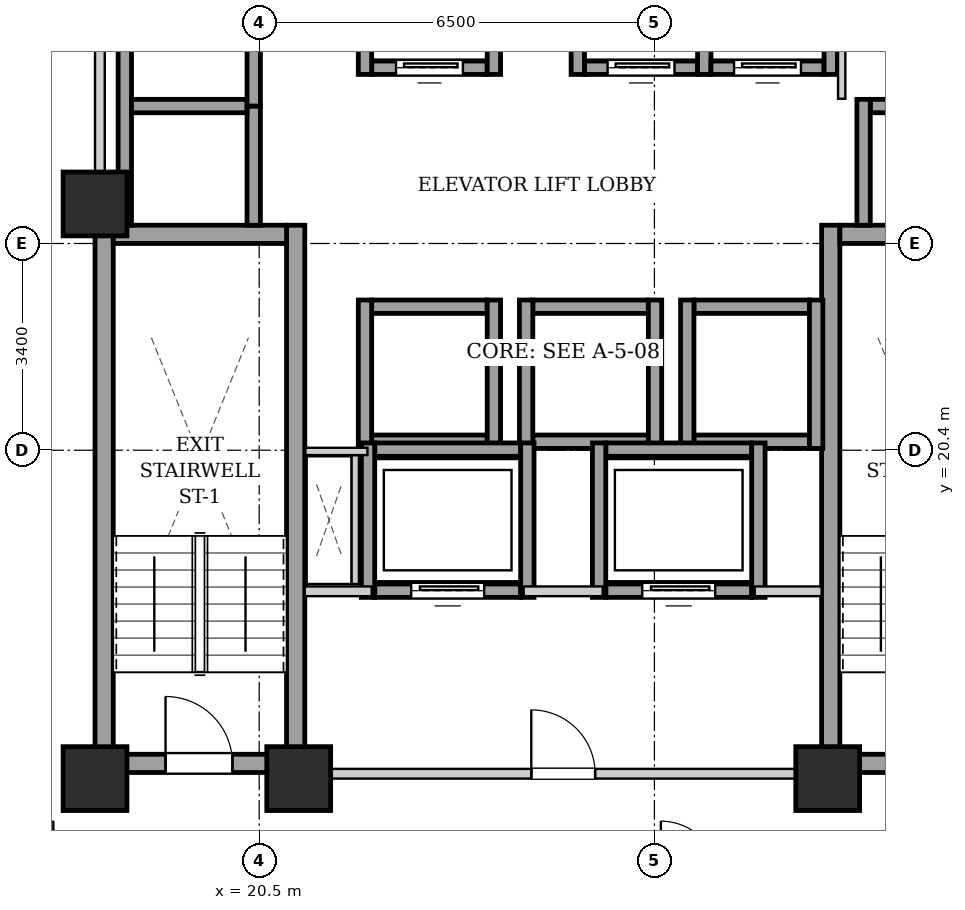
"""IFC4 building model, lengths in metres.
Left out: names, types, materials, properties, quantities, classifications, styles, units other than length and angle.
Written with IfcOpenShell. Run it as: python <this file> out.ifc"""

import sys

from ifc_helpers import new_model, si_unit, direction, frame, frame_2d, origin, origin_2d, place, context, subcontext, project, spatial, rectangle, extrude, element, fill, save


model = new_model("IFC4")
c1 = context("Model", 3, precision=1e-05, world=origin(), true_north=direction((0.0, 1.0)))
c2 = subcontext(c1, "Body", "Model", "MODEL_VIEW")
j1 = project(units=[si_unit("LENGTHUNIT", "METRE"), si_unit("PLANEANGLEUNIT", "RADIAN")], contexts=[c1])
p1 = place(None, origin())
s1 = spatial("IfcSite", under=j1, at=p1, CompositionType="ELEMENT")
p2 = place(p1, origin())
s2 = spatial("IfcBuilding", under=s1, at=p2, CompositionType="ELEMENT")
p3 = place(p2, frame((0.0, 0.0, 91.1)))
s3 = spatial("IfcBuildingStorey", under=s2, at=p3, CompositionType="ELEMENT", Elevation=91.1)
for number, where, z_axis, x_axis in (
    (1, (17.8, 15.0, 0.0), (0.0, 0.0, 1.0), (1.0, 0.0, 0.0)),
    (2, (21.15, 15.0, 0.0), (0.0, 0.0, 1.0), (1.0, 0.0, 0.0)),
    (3, (29.85, 15.0, 0.0), (0.0, 0.0, 1.0), (1.0, 0.0, 0.0)),
    (4, (17.8, 24.45, 0.0), (0.0, 0.0, 1.0), (1.0, 0.0, 0.0)),
):
    element("IfcColumn", number, at=place(p3, frame(where, z_axis=z_axis, x_axis=x_axis)), inside=s3, PredefinedType="COLUMN", context=c2, shape_type="SweptSolid", body=[
        extrude(rectangle(XDim=1.05, YDim=1.05, at=origin_2d()), origin(), (0.0, 0.0, 1.0), 3.2),
    ])
for number, where, z_axis, x_axis in (
    (5, (17.95, 15.1, 0.0), (0.0, 0.0, 1.0), (0.0, 1.0, 0.0)),
    (6, (21.1, 15.1, 0.0), (0.0, 0.0, 1.0), (0.0, 1.0, 0.0)),
):
    element("IfcWall", number, at=place(p3, frame(where, z_axis=z_axis, x_axis=x_axis)), inside=s3, PredefinedType="SHEAR", context=c2, shape_type="SweptSolid", body=[
        extrude(rectangle(XDim=9.0, YDim=0.3, at=frame_2d((4.5, 0.0))), origin(), (0.0, 0.0, 1.0), 2.94),
    ])
p4 = place(p3, frame((18.1, 23.95, 0.0), z_axis=(0.0, 0.0, 1.0), x_axis=(1.0, 0.0, 0.0)))
e7 = element("IfcWall", 7, at=p4, inside=s3, PredefinedType="SHEAR", context=c2, shape_type="SweptSolid", body=[
    extrude(rectangle(XDim=2.85, YDim=0.3, at=frame_2d((1.425, 0.0))), origin(), (0.0, 0.0, 1.0), 2.94),
])
p5 = place(p3, frame((18.1, 15.25, 0.0), z_axis=(0.0, 0.0, 1.0), x_axis=(1.0, 0.0, 0.0)))
e8 = element("IfcWall", 8, at=p5, inside=s3, PredefinedType="SHEAR", context=c2, shape_type="SweptSolid", body=[
    extrude(rectangle(XDim=2.85, YDim=0.3, at=frame_2d((1.425, 0.0))), origin(), (0.0, 0.0, 1.0), 2.94),
])
p6 = place(p5, frame((0.86, 0.0, 0.0)))
e9 = element("IfcOpeningElement", 9, at=p6, cuts=e8, PredefinedType="OPENING", context=c2, shape_type="SweptSolid", body=[
    extrude(rectangle(XDim=1.1, YDim=2.05, at=frame_2d((0.55, 1.025))), frame((0.0, 0.16, 0.0), z_axis=(0.0, -1.0, 0.0), x_axis=(1.0, 0.0, 0.0)), (0.0, 0.0, 1.0), 0.32),
])
p7 = place(p3, frame((29.9, 15.1, 0.0), z_axis=(0.0, 0.0, 1.0), x_axis=(0.0, 1.0, 0.0)))
e10 = element("IfcWall", 10, at=p7, inside=s3, PredefinedType="SHEAR", context=c2, shape_type="SweptSolid", body=[
    extrude(rectangle(XDim=9.0, YDim=0.3, at=frame_2d((4.5, 0.0))), origin(), (0.0, 0.0, 1.0), 2.94),
])
p8 = place(p3, frame((30.05, 23.95, 0.0), z_axis=(0.0, 0.0, 1.0), x_axis=(1.0, 0.0, 0.0)))
e11 = element("IfcWall", 11, at=p8, inside=s3, PredefinedType="SHEAR", context=c2, shape_type="SweptSolid", body=[
    extrude(rectangle(XDim=2.85, YDim=0.3, at=frame_2d((1.425, 0.0))), origin(), (0.0, 0.0, 1.0), 2.94),
])
p9 = place(p3, frame((30.05, 15.25, 0.0), z_axis=(0.0, 0.0, 1.0), x_axis=(1.0, 0.0, 0.0)))
e12 = element("IfcWall", 12, at=p9, inside=s3, PredefinedType="SHEAR", context=c2, shape_type="SweptSolid", body=[
    extrude(rectangle(XDim=2.85, YDim=0.3, at=frame_2d((1.425, 0.0))), origin(), (0.0, 0.0, 1.0), 2.94),
])
p10 = place(p9, frame((0.86, 0.0, 0.0)))
e13 = element("IfcOpeningElement", 13, at=p10, cuts=e12, PredefinedType="OPENING", context=c2, shape_type="SweptSolid", body=[
    extrude(rectangle(XDim=1.1, YDim=2.05, at=frame_2d((0.55, 1.025))), frame((0.0, 0.16, 0.0), z_axis=(0.0, -1.0, 0.0), x_axis=(1.0, 0.0, 0.0)), (0.0, 0.0, 1.0), 0.32),
])
p11 = place(p3, frame((22.35, 26.69, 0.0), z_axis=(0.0, 0.0, 1.0), x_axis=(1.0, 0.0, 0.0)))
e14 = element("IfcWall", 14, at=p11, inside=s3, PredefinedType="SHEAR", context=c2, shape_type="SweptSolid", body=[
    extrude(rectangle(XDim=1.9, YDim=0.22, at=frame_2d((0.95, 0.0))), origin(), (0.0, 0.0, 1.0), 2.94),
])
p12 = place(p11, frame((0.4, 0.0, 0.0)))
e15 = element("IfcOpeningElement", 15, at=p12, cuts=e14, PredefinedType="OPENING", context=c2, shape_type="SweptSolid", body=[
    extrude(rectangle(XDim=1.1, YDim=2.15, at=frame_2d((0.55, 1.075))), frame((0.0, 0.12, 0.0), z_axis=(0.0, -1.0, 0.0), x_axis=(1.0, 0.0, 0.0)), (0.0, 0.0, 1.0), 0.24),
])
for number, where, z_axis, x_axis in (
    (16, (22.24, 26.58, 0.0), (0.0, 0.0, 1.0), (0.0, 1.0, 0.0)),
    (17, (24.36, 26.58, 0.0), (0.0, 0.0, 1.0), (0.0, 1.0, 0.0)),
):
    element("IfcWall", number, at=place(p3, frame(where, z_axis=z_axis, x_axis=x_axis)), inside=s3, PredefinedType="SHEAR", context=c2, shape_type="SweptSolid", body=[
        extrude(rectangle(XDim=2.44, YDim=0.22, at=frame_2d((1.22, 0.0))), origin(), (0.0, 0.0, 1.0), 2.94),
    ])
p13 = place(p3, frame((25.85, 26.69, 0.0), z_axis=(0.0, 0.0, 1.0), x_axis=(1.0, 0.0, 0.0)))
e18 = element("IfcWall", 18, at=p13, inside=s3, PredefinedType="SHEAR", context=c2, shape_type="SweptSolid", body=[
    extrude(rectangle(XDim=1.86, YDim=0.22, at=frame_2d((0.93, 0.0))), origin(), (0.0, 0.0, 1.0), 2.94),
])
p14 = place(p13, frame((0.38, 0.0, 0.0)))
e19 = element("IfcOpeningElement", 19, at=p14, cuts=e18, PredefinedType="OPENING", context=c2, shape_type="SweptSolid", body=[
    extrude(rectangle(XDim=1.1, YDim=2.15, at=frame_2d((0.55, 1.075))), frame((0.0, 0.12, 0.0), z_axis=(0.0, -1.0, 0.0), x_axis=(1.0, 0.0, 0.0)), (0.0, 0.0, 1.0), 0.24),
])
for number, where, z_axis, x_axis in (
    (20, (25.74, 26.58, 0.0), (0.0, 0.0, 1.0), (0.0, 1.0, 0.0)),
    (21, (27.82, 26.58, 0.0), (0.0, 0.0, 1.0), (0.0, 1.0, 0.0)),
):
    element("IfcWall", number, at=place(p3, frame(where, z_axis=z_axis, x_axis=x_axis)), inside=s3, PredefinedType="SHEAR", context=c2, shape_type="SweptSolid", body=[
        extrude(rectangle(XDim=2.44, YDim=0.22, at=frame_2d((1.22, 0.0))), origin(), (0.0, 0.0, 1.0), 2.94),
    ])
p15 = place(p3, frame((27.93, 26.69, 0.0), z_axis=(0.0, 0.0, 1.0), x_axis=(1.0, 0.0, 0.0)))
e22 = element("IfcWall", 22, at=p15, inside=s3, PredefinedType="SHEAR", context=c2, shape_type="SweptSolid", body=[
    extrude(rectangle(XDim=1.86, YDim=0.22, at=frame_2d((0.93, 0.0))), origin(), (0.0, 0.0, 1.0), 2.94),
])
p16 = place(p15, frame((0.38, 0.0, 0.0)))
e23 = element("IfcOpeningElement", 23, at=p16, cuts=e22, PredefinedType="OPENING", context=c2, shape_type="SweptSolid", body=[
    extrude(rectangle(XDim=1.1, YDim=2.15, at=frame_2d((0.55, 1.075))), frame((0.0, 0.12, 0.0), z_axis=(0.0, -1.0, 0.0), x_axis=(1.0, 0.0, 0.0)), (0.0, 0.0, 1.0), 0.24),
])
p17 = place(p3, frame((29.9, 26.58, 0.0), z_axis=(0.0, 0.0, 1.0), x_axis=(0.0, 1.0, 0.0)))
e24 = element("IfcWall", 24, at=p17, inside=s3, PredefinedType="SHEAR", context=c2, shape_type="SweptSolid", body=[
    extrude(rectangle(XDim=2.44, YDim=0.22, at=frame_2d((1.22, 0.0))), origin(), (0.0, 0.0, 1.0), 2.94),
])
for number, where, z_axis, x_axis in (
    (25, (22.35, 20.54, 0.0), (0.0, 0.0, 1.0), (1.0, 0.0, 0.0)),
    (26, (22.35, 22.76, 0.0), (0.0, 0.0, 1.0), (1.0, 0.0, 0.0)),
):
    element("IfcWall", number, at=place(p3, frame(where, z_axis=z_axis, x_axis=x_axis)), inside=s3, PredefinedType="SHEAR", context=c2, shape_type="SweptSolid", body=[
        extrude(rectangle(XDim=1.9, YDim=0.22, at=frame_2d((0.95, 0.0))), origin(), (0.0, 0.0, 1.0), 2.94),
    ])
for number, where, z_axis, x_axis in (
    (27, (22.24, 20.43, 0.0), (0.0, 0.0, 1.0), (0.0, 1.0, 0.0)),
    (28, (24.36, 20.43, 0.0), (0.0, 0.0, 1.0), (0.0, 1.0, 0.0)),
):
    element("IfcWall", number, at=place(p3, frame(where, z_axis=z_axis, x_axis=x_axis)), inside=s3, PredefinedType="SHEAR", context=c2, shape_type="SweptSolid", body=[
        extrude(rectangle(XDim=2.44, YDim=0.22, at=frame_2d((1.22, 0.0))), origin(), (0.0, 0.0, 1.0), 2.94),
    ])
for number, where, z_axis, x_axis in (
    (29, (25.0, 20.54, 0.0), (0.0, 0.0, 1.0), (1.0, 0.0, 0.0)),
    (30, (25.0, 22.76, 0.0), (0.0, 0.0, 1.0), (1.0, 0.0, 0.0)),
):
    element("IfcWall", number, at=place(p3, frame(where, z_axis=z_axis, x_axis=x_axis)), inside=s3, PredefinedType="SHEAR", context=c2, shape_type="SweptSolid", body=[
        extrude(rectangle(XDim=1.9, YDim=0.22, at=frame_2d((0.95, 0.0))), origin(), (0.0, 0.0, 1.0), 2.94),
    ])
for number, where, z_axis, x_axis in (
    (31, (24.89, 20.43, 0.0), (0.0, 0.0, 1.0), (0.0, 1.0, 0.0)),
    (32, (27.01, 20.43, 0.0), (0.0, 0.0, 1.0), (0.0, 1.0, 0.0)),
):
    element("IfcWall", number, at=place(p3, frame(where, z_axis=z_axis, x_axis=x_axis)), inside=s3, PredefinedType="SHEAR", context=c2, shape_type="SweptSolid", body=[
        extrude(rectangle(XDim=2.44, YDim=0.22, at=frame_2d((1.22, 0.0))), origin(), (0.0, 0.0, 1.0), 2.94),
    ])
for number, where, z_axis, x_axis in (
    (33, (27.65, 20.54, 0.0), (0.0, 0.0, 1.0), (1.0, 0.0, 0.0)),
    (34, (27.65, 22.76, 0.0), (0.0, 0.0, 1.0), (1.0, 0.0, 0.0)),
):
    element("IfcWall", number, at=place(p3, frame(where, z_axis=z_axis, x_axis=x_axis)), inside=s3, PredefinedType="SHEAR", context=c2, shape_type="SweptSolid", body=[
        extrude(rectangle(XDim=1.9, YDim=0.22, at=frame_2d((0.95, 0.0))), origin(), (0.0, 0.0, 1.0), 2.94),
    ])
for number, where, z_axis, x_axis in (
    (35, (27.54, 20.43, 0.0), (0.0, 0.0, 1.0), (0.0, 1.0, 0.0)),
    (36, (29.66, 20.43, 0.0), (0.0, 0.0, 1.0), (0.0, 1.0, 0.0)),
):
    element("IfcWall", number, at=place(p3, frame(where, z_axis=z_axis, x_axis=x_axis)), inside=s3, PredefinedType="SHEAR", context=c2, shape_type="SweptSolid", body=[
        extrude(rectangle(XDim=2.44, YDim=0.22, at=frame_2d((1.22, 0.0))), origin(), (0.0, 0.0, 1.0), 2.94),
    ])
p18 = place(p3, frame((18.29, 24.1, 0.0), z_axis=(0.0, 0.0, 1.0), x_axis=(0.0, 1.0, 0.0)))
e37 = element("IfcWall", 37, at=p18, inside=s3, PredefinedType="SHEAR", context=c2, shape_type="SweptSolid", body=[
    extrude(rectangle(XDim=4.14, YDim=0.22, at=frame_2d((2.07, 0.0))), origin(), (0.0, 0.0, 1.0), 2.94),
])
p19 = place(p3, frame((20.41, 24.1, 0.0), z_axis=(0.0, 0.0, 1.0), x_axis=(0.0, 1.0, 0.0)))
e38 = element("IfcWall", 38, at=p19, inside=s3, PredefinedType="SHEAR", context=c2, shape_type="SweptSolid", body=[
    extrude(rectangle(XDim=1.96, YDim=0.22, at=frame_2d((0.98, 0.0))), origin(), (0.0, 0.0, 1.0), 2.94),
])
p20 = place(p3, frame((18.4, 26.06, 0.0), z_axis=(0.0, 0.0, 1.0), x_axis=(1.0, 0.0, 0.0)))
e39 = element("IfcWall", 39, at=p20, inside=s3, PredefinedType="SHEAR", context=c2, shape_type="SweptSolid", body=[
    extrude(rectangle(XDim=1.9, YDim=0.22, at=frame_2d((0.95, 0.0))), origin(), (0.0, 0.0, 1.0), 2.94),
])
p21 = place(p3, frame((20.41, 26.06, 0.0), z_axis=(0.0, 0.0, 1.0), x_axis=(0.0, 1.0, 0.0)))
e40 = element("IfcWall", 40, at=p21, inside=s3, PredefinedType="SHEAR", context=c2, shape_type="SweptSolid", body=[
    extrude(rectangle(XDim=2.18, YDim=0.22, at=frame_2d((1.09, 0.0))), origin(), (0.0, 0.0, 1.0), 2.94),
])
p22 = place(p3, frame((30.55, 26.06, 0.0), z_axis=(0.0, 0.0, 1.0), x_axis=(1.0, 0.0, 0.0)))
e41 = element("IfcWall", 41, at=p22, inside=s3, PredefinedType="SHEAR", context=c2, shape_type="SweptSolid", body=[
    extrude(rectangle(XDim=1.9, YDim=0.22, at=frame_2d((0.95, 0.0))), origin(), (0.0, 0.0, 1.0), 2.94),
])
p23 = place(p3, frame((30.44, 24.1, 0.0), z_axis=(0.0, 0.0, 1.0), x_axis=(0.0, 1.0, 0.0)))
e42 = element("IfcWall", 42, at=p23, inside=s3, PredefinedType="SHEAR", context=c2, shape_type="SweptSolid", body=[
    extrude(rectangle(XDim=2.07, YDim=0.22, at=frame_2d((1.035, 0.0))), origin(), (0.0, 0.0, 1.0), 2.94),
])
p24 = place(p3, frame((22.4, 18.09, 0.0), z_axis=(0.0, 0.0, 1.0), x_axis=(1.0, 0.0, 0.0)))
e43 = element("IfcWall", 43, at=p24, inside=s3, PredefinedType="SHEAR", context=c2, shape_type="SweptSolid", body=[
    extrude(rectangle(XDim=2.4, YDim=0.22, at=frame_2d((1.2, 0.0))), origin(), (0.0, 0.0, 1.0), 2.94),
])
p25 = place(p24, frame((0.6, 0.0, 0.0)))
e44 = element("IfcOpeningElement", 44, at=p25, cuts=e43, PredefinedType="OPENING", context=c2, shape_type="SweptSolid", body=[
    extrude(rectangle(XDim=1.2, YDim=2.15, at=frame_2d((0.6, 1.075))), frame((0.0, 0.12, 0.0), z_axis=(0.0, -1.0, 0.0), x_axis=(1.0, 0.0, 0.0)), (0.0, 0.0, 1.0), 0.24),
])
p26 = place(p3, frame((22.4, 20.41, 0.0), z_axis=(0.0, 0.0, 1.0), x_axis=(1.0, 0.0, 0.0)))
e45 = element("IfcWall", 45, at=p26, inside=s3, PredefinedType="SHEAR", context=c2, shape_type="SweptSolid", body=[
    extrude(rectangle(XDim=2.4, YDim=0.22, at=frame_2d((1.2, 0.0))), origin(), (0.0, 0.0, 1.0), 2.94),
])
for number, where, z_axis, x_axis in (
    (46, (22.29, 17.98, 0.0), (0.0, 0.0, 1.0), (0.0, 1.0, 0.0)),
    (47, (24.91, 17.98, 0.0), (0.0, 0.0, 1.0), (0.0, 1.0, 0.0)),
):
    element("IfcWall", number, at=place(p3, frame(where, z_axis=z_axis, x_axis=x_axis)), inside=s3, PredefinedType="SHEAR", context=c2, shape_type="SweptSolid", body=[
        extrude(rectangle(XDim=2.54, YDim=0.22, at=frame_2d((1.27, 0.0))), origin(), (0.0, 0.0, 1.0), 2.94),
    ])
p27 = place(p3, frame((26.2, 18.09, 0.0), z_axis=(0.0, 0.0, 1.0), x_axis=(1.0, 0.0, 0.0)))
e48 = element("IfcWall", 48, at=p27, inside=s3, PredefinedType="SHEAR", context=c2, shape_type="SweptSolid", body=[
    extrude(rectangle(XDim=2.4, YDim=0.22, at=frame_2d((1.2, 0.0))), origin(), (0.0, 0.0, 1.0), 2.94),
])
p28 = place(p27, frame((0.6, 0.0, 0.0)))
e49 = element("IfcOpeningElement", 49, at=p28, cuts=e48, PredefinedType="OPENING", context=c2, shape_type="SweptSolid", body=[
    extrude(rectangle(XDim=1.2, YDim=2.15, at=frame_2d((0.6, 1.075))), frame((0.0, 0.12, 0.0), z_axis=(0.0, -1.0, 0.0), x_axis=(1.0, 0.0, 0.0)), (0.0, 0.0, 1.0), 0.24),
])
p29 = place(p3, frame((26.2, 20.41, 0.0), z_axis=(0.0, 0.0, 1.0), x_axis=(1.0, 0.0, 0.0)))
e50 = element("IfcWall", 50, at=p29, inside=s3, PredefinedType="SHEAR", context=c2, shape_type="SweptSolid", body=[
    extrude(rectangle(XDim=2.4, YDim=0.22, at=frame_2d((1.2, 0.0))), origin(), (0.0, 0.0, 1.0), 2.94),
])
for number, where, z_axis, x_axis in (
    (51, (26.09, 17.98, 0.0), (0.0, 0.0, 1.0), (0.0, 1.0, 0.0)),
    (52, (28.71, 17.98, 0.0), (0.0, 0.0, 1.0), (0.0, 1.0, 0.0)),
):
    element("IfcWall", number, at=place(p3, frame(where, z_axis=z_axis, x_axis=x_axis)), inside=s3, PredefinedType="SHEAR", context=c2, shape_type="SweptSolid", body=[
        extrude(rectangle(XDim=2.54, YDim=0.22, at=frame_2d((1.27, 0.0))), origin(), (0.0, 0.0, 1.0), 2.94),
    ])
p30 = place(p3, frame((21.25, 15.08, 0.0), z_axis=(0.0, 0.0, 1.0), x_axis=(1.0, 0.0, 0.0)))
e53 = element("IfcWall", 53, at=p30, inside=s3, PredefinedType="PARTITIONING", context=c2, shape_type="SweptSolid", body=[
    extrude(rectangle(XDim=8.5, YDim=0.16, at=frame_2d((4.25, 0.0))), origin(), (0.0, 0.0, 1.0), 2.309),
])
p31 = place(p30, frame((3.725, 0.0, 0.0)))
e54 = element("IfcOpeningElement", 54, at=p31, cuts=e53, PredefinedType="OPENING", context=c2, shape_type="SweptSolid", body=[
    extrude(rectangle(XDim=1.05, YDim=2.05, at=frame_2d((0.525, 1.025))), frame((0.0, 0.09, 0.0), z_axis=(0.0, -1.0, 0.0), x_axis=(1.0, 0.0, 0.0)), (0.0, 0.0, 1.0), 0.18),
])
p32 = place(p3, frame((21.25, 18.08, 0.0), z_axis=(0.0, 0.0, 1.0), x_axis=(1.0, 0.0, 0.0)))
e55 = element("IfcWall", 55, at=p32, inside=s3, PredefinedType="PARTITIONING", context=c2, shape_type="SweptSolid", body=[
    extrude(rectangle(XDim=1.1, YDim=0.16, at=frame_2d((0.55, 0.0))), origin(), (0.0, 0.0, 1.0), 2.94),
])
p33 = place(p3, frame((24.85, 18.08, 0.0), z_axis=(0.0, 0.0, 1.0), x_axis=(1.0, 0.0, 0.0)))
e56 = element("IfcWall", 56, at=p33, inside=s3, PredefinedType="PARTITIONING", context=c2, shape_type="SweptSolid", body=[
    extrude(rectangle(XDim=1.3, YDim=0.16, at=frame_2d((0.65, 0.0))), origin(), (0.0, 0.0, 1.0), 2.94),
])
p34 = place(p3, frame((28.65, 18.08, 0.0), z_axis=(0.0, 0.0, 1.0), x_axis=(1.0, 0.0, 0.0)))
e57 = element("IfcWall", 57, at=p34, inside=s3, PredefinedType="PARTITIONING", context=c2, shape_type="SweptSolid", body=[
    extrude(rectangle(XDim=1.1, YDim=0.16, at=frame_2d((0.55, 0.0))), origin(), (0.0, 0.0, 1.0), 2.94),
])
p35 = place(p3, frame((17.88, 24.12, 0.0), z_axis=(0.0, 0.0, 1.0), x_axis=(0.0, 1.0, 0.0)))
e58 = element("IfcWall", 58, at=p35, inside=s3, PredefinedType="PARTITIONING", context=c2, shape_type="SweptSolid", body=[
    extrude(rectangle(XDim=4.76, YDim=0.16, at=frame_2d((2.38, 0.0))), origin(), (0.0, 0.0, 1.0), 2.94),
])
p36 = place(p3, frame((22.08, 18.2, 0.0), z_axis=(0.0, 0.0, 1.0), x_axis=(0.0, 1.0, 0.0)))
e59 = element("IfcWall", 59, at=p36, inside=s3, PredefinedType="PARTITIONING", context=c2, shape_type="SweptSolid", body=[
    extrude(rectangle(XDim=2.12, YDim=0.12, at=frame_2d((1.06, 0.0))), origin(), (0.0, 0.0, 1.0), 2.94),
])
p37 = place(p3, frame((22.28, 20.38, 0.0), z_axis=(0.0, 0.0, 1.0), x_axis=(-1.0, 0.0, 0.0)))
e60 = element("IfcWall", 60, at=p37, inside=s3, PredefinedType="PARTITIONING", context=c2, shape_type="SweptSolid", body=[
    extrude(rectangle(XDim=1.02, YDim=0.12, at=frame_2d((0.51, 0.0))), origin(), (0.0, 0.0, 1.0), 2.94),
])
p38 = place(p3, frame((30.08, 26.18, 0.0), z_axis=(0.0, 0.0, 1.0), x_axis=(0.0, 1.0, 0.0)))
e61 = element("IfcWall", 61, at=p38, inside=s3, PredefinedType="PARTITIONING", context=c2, shape_type="SweptSolid", body=[
    extrude(rectangle(XDim=2.68, YDim=0.12, at=frame_2d((1.34, 0.0))), origin(), (0.0, 0.0, 1.0), 2.94),
])
p39 = place(p6, origin())
e62 = element("IfcDoor", 62, at=p39, inside=s3, OperationType="SINGLE_SWING_LEFT", PredefinedType="DOOR", context=c2, shape_type="SweptSolid", body=[
    extrude(rectangle(XDim=1.1, YDim=2.05, at=frame_2d((0.55, 1.025))), frame((0.0, 0.025, 0.0), z_axis=(0.0, -1.0, 0.0), x_axis=(1.0, 0.0, 0.0)), (0.0, 0.0, 1.0), 0.05),
])
fill(e9, e62)
p40 = place(p12, origin())
e63 = element("IfcDoor", 63, at=p40, inside=s3, OperationType="SLIDING_TO_LEFT", PredefinedType="DOOR", context=c2, shape_type="SweptSolid", body=[
    extrude(rectangle(XDim=1.1, YDim=2.15, at=frame_2d((0.55, 1.075))), frame((0.0, 0.025, 0.0), z_axis=(0.0, -1.0, 0.0), x_axis=(1.0, 0.0, 0.0)), (0.0, 0.0, 1.0), 0.05),
])
fill(e15, e63)
p41 = place(p14, origin())
e64 = element("IfcDoor", 64, at=p41, inside=s3, OperationType="SLIDING_TO_LEFT", PredefinedType="DOOR", context=c2, shape_type="SweptSolid", body=[
    extrude(rectangle(XDim=1.1, YDim=2.15, at=frame_2d((0.55, 1.075))), frame((0.0, 0.025, 0.0), z_axis=(0.0, -1.0, 0.0), x_axis=(1.0, 0.0, 0.0)), (0.0, 0.0, 1.0), 0.05),
])
fill(e19, e64)
p42 = place(p16, origin())
e65 = element("IfcDoor", 65, at=p42, inside=s3, OperationType="SLIDING_TO_LEFT", PredefinedType="DOOR", context=c2, shape_type="SweptSolid", body=[
    extrude(rectangle(XDim=1.1, YDim=2.15, at=frame_2d((0.55, 1.075))), frame((0.0, 0.025, 0.0), z_axis=(0.0, -1.0, 0.0), x_axis=(1.0, 0.0, 0.0)), (0.0, 0.0, 1.0), 0.05),
])
fill(e23, e65)
p43 = place(p25, origin())
e66 = element("IfcDoor", 66, at=p43, inside=s3, OperationType="SLIDING_TO_LEFT", PredefinedType="DOOR", context=c2, shape_type="SweptSolid", body=[
    extrude(rectangle(XDim=1.2, YDim=2.15, at=frame_2d((0.6, 1.075))), frame((0.0, 0.025, 0.0), z_axis=(0.0, -1.0, 0.0), x_axis=(1.0, 0.0, 0.0)), (0.0, 0.0, 1.0), 0.05),
])
fill(e44, e66)
p44 = place(p28, origin())
e67 = element("IfcDoor", 67, at=p44, inside=s3, OperationType="SLIDING_TO_LEFT", PredefinedType="DOOR", context=c2, shape_type="SweptSolid", body=[
    extrude(rectangle(XDim=1.2, YDim=2.15, at=frame_2d((0.6, 1.075))), frame((0.0, 0.025, 0.0), z_axis=(0.0, -1.0, 0.0), x_axis=(1.0, 0.0, 0.0)), (0.0, 0.0, 1.0), 0.05),
])
fill(e49, e67)
p45 = place(p31, origin())
e68 = element("IfcDoor", 68, at=p45, inside=s3, OperationType="SINGLE_SWING_LEFT", PredefinedType="DOOR", context=c2, shape_type="SweptSolid", body=[
    extrude(rectangle(XDim=1.05, YDim=2.05, at=frame_2d((0.525, 1.025))), frame((0.0, 0.025, 0.0), z_axis=(0.0, -1.0, 0.0), x_axis=(1.0, 0.0, 0.0)), (0.0, 0.0, 1.0), 0.05),
])
fill(e54, e68)
save(model, sys.argv[1])
